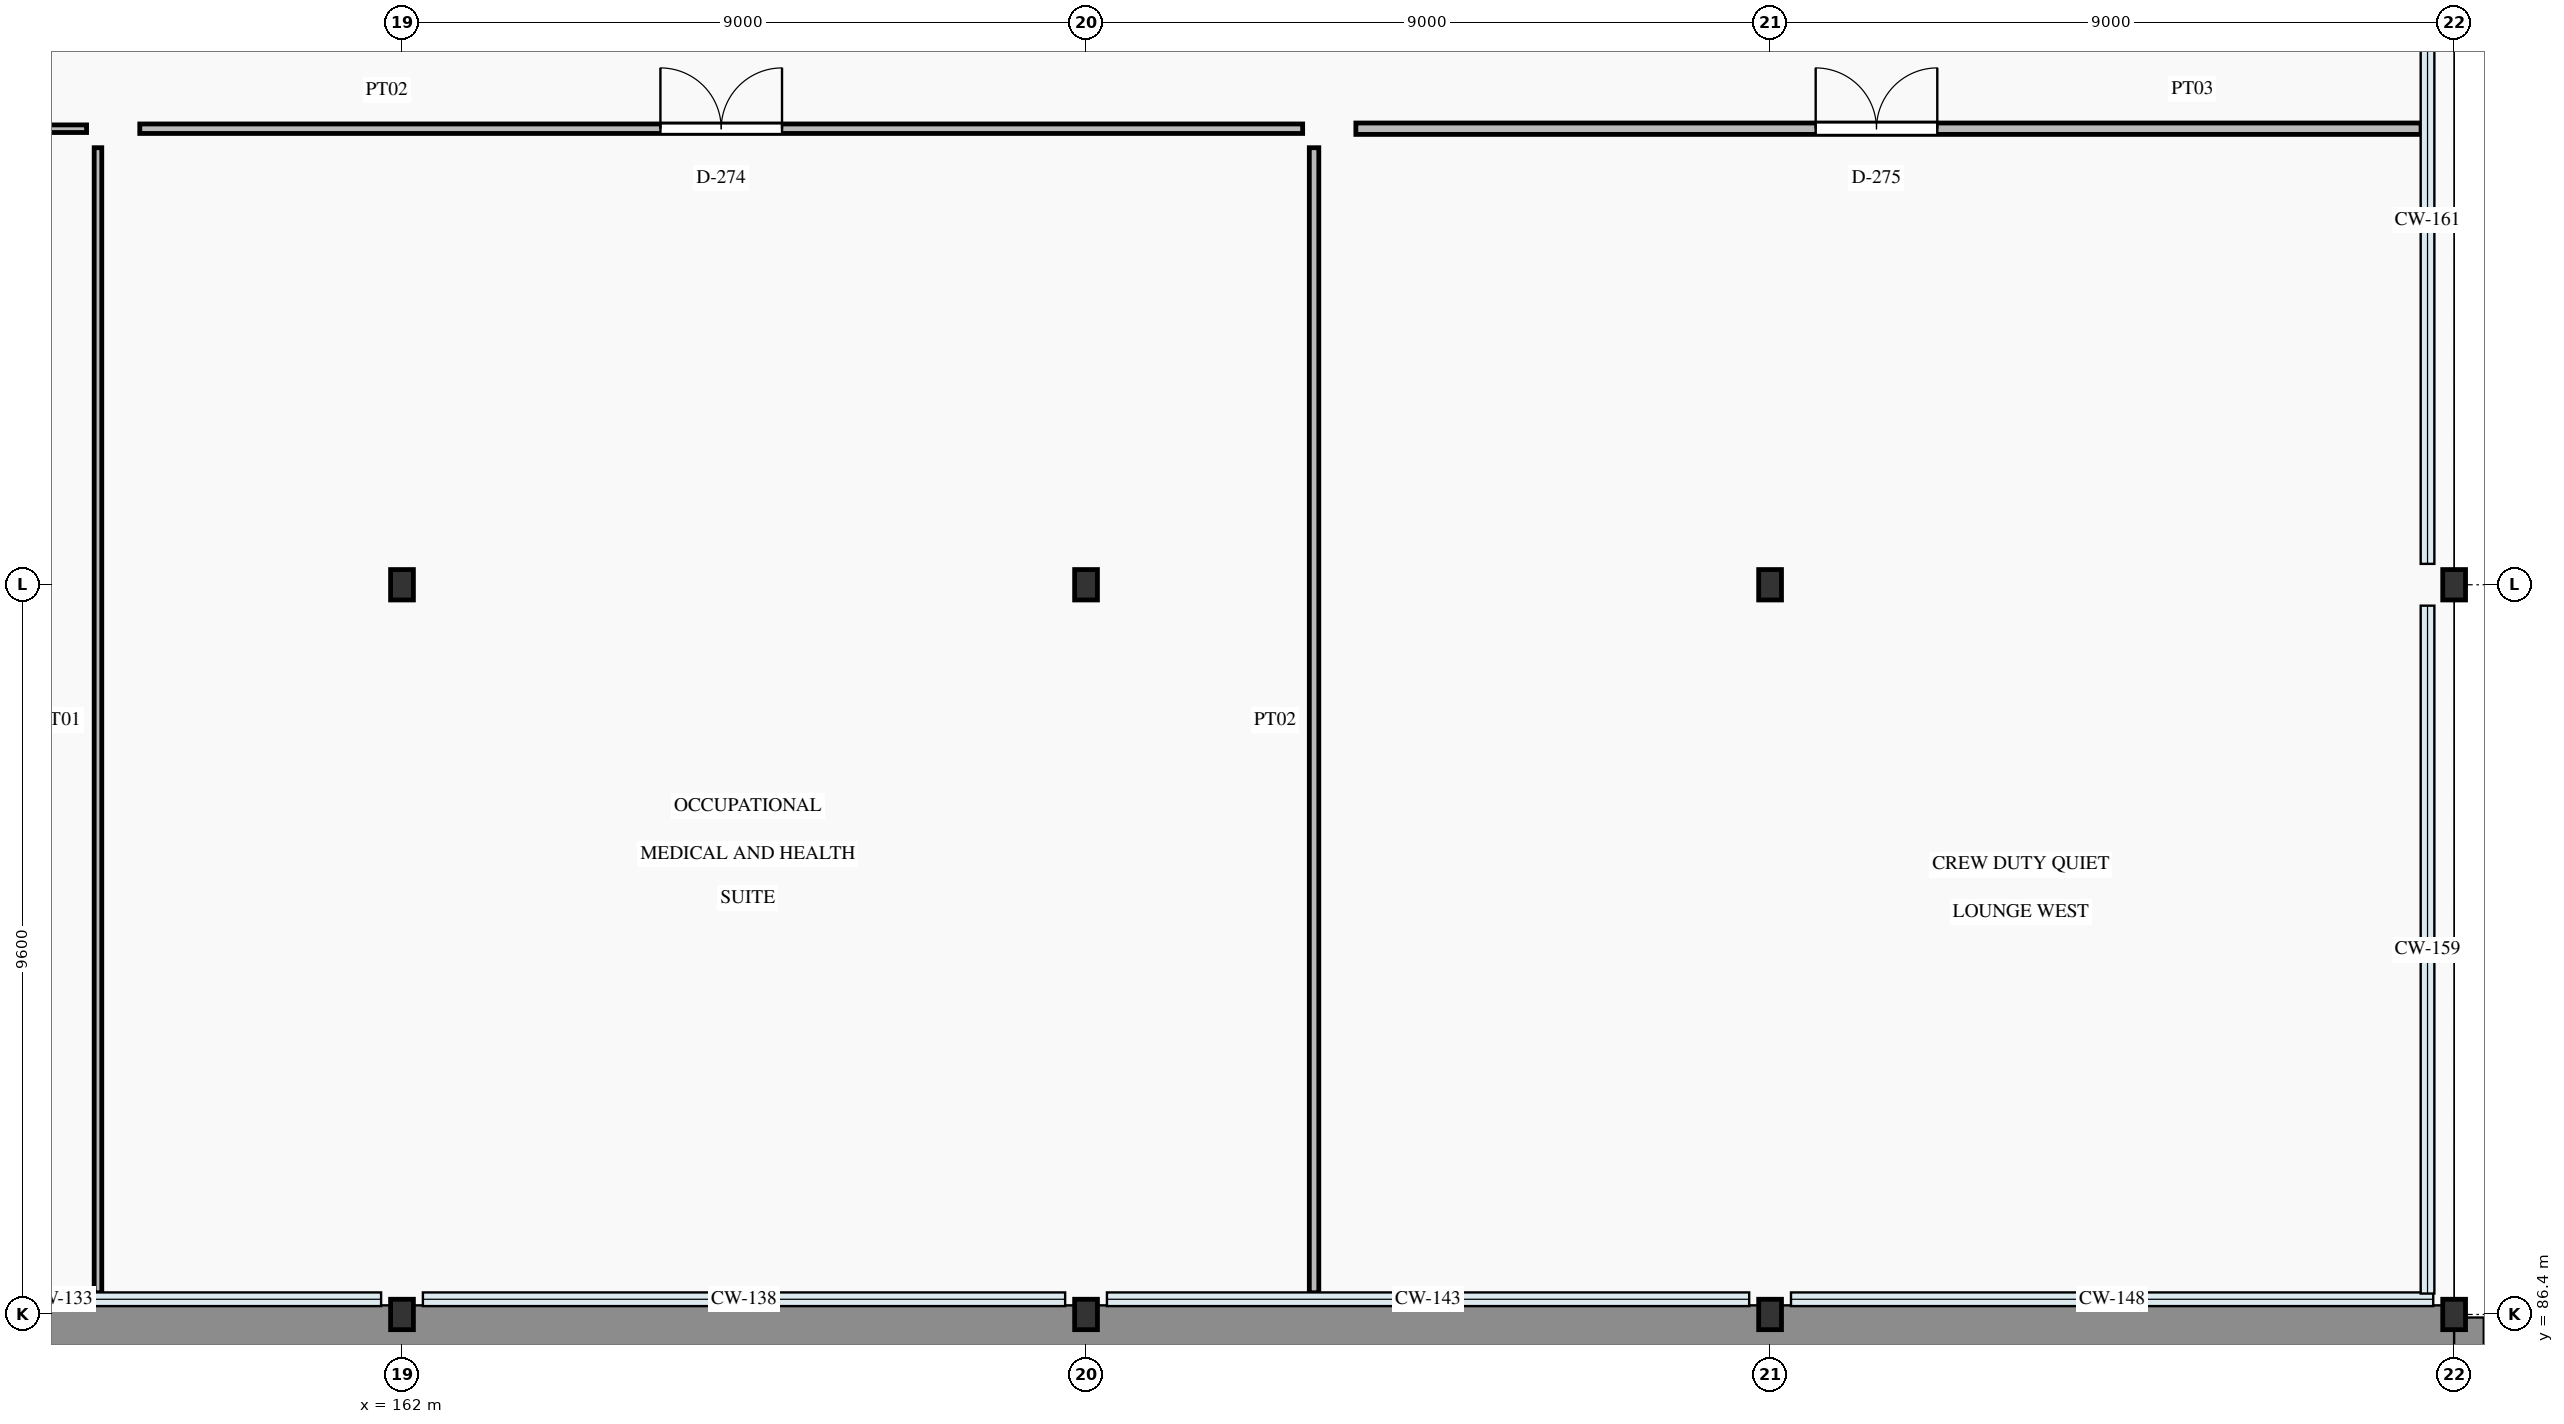
"""IFC4 building model, lengths in metres.
Left out: names, types, materials, properties, quantities, classifications, styles, units other than length and angle.
Written with IfcOpenShell. Run it as: python <this file> out.ifc"""

import sys

from ifc_helpers import new_model, si_unit, direction, frame, frame_2d, origin, origin_2d, place, context, subcontext, project, spatial, rectangle, i_section, extrude, element, fill, save


model = new_model("IFC4")
c1 = context("Model", 3, precision=1e-05, world=origin(), true_north=direction((0.0, 1.0)))
c2 = subcontext(c1, "Body", "Model", "MODEL_VIEW")
j1 = project(units=[si_unit("LENGTHUNIT", "METRE"), si_unit("PLANEANGLEUNIT", "RADIAN")], contexts=[c1])
p1 = place(None, origin())
s1 = spatial("IfcSite", under=j1, at=p1, CompositionType="ELEMENT")
p2 = place(p1, origin())
s2 = spatial("IfcBuilding", under=s1, at=p2, CompositionType="ELEMENT")
p3 = place(p2, frame((0.0, 0.0, 15.0)))
s3 = spatial("IfcBuildingStorey", under=s2, at=p3, CompositionType="ELEMENT", Elevation=15.0)
for number, where, z_axis, x_axis in (
    (1, (162.0, 86.4, 0.0), (0.0, 0.0, 1.0), (1.0, 0.0, 0.0)),
    (2, (162.0, 96.0, 0.0), (0.0, 0.0, 1.0), (1.0, 0.0, 0.0)),
    (3, (171.0, 86.4, 0.0), (0.0, 0.0, 1.0), (1.0, 0.0, 0.0)),
    (4, (171.0, 96.0, 0.0), (0.0, 0.0, 1.0), (1.0, 0.0, 0.0)),
    (5, (180.0, 86.4, 0.0), (0.0, 0.0, 1.0), (1.0, 0.0, 0.0)),
    (6, (180.0, 96.0, 0.0), (0.0, 0.0, 1.0), (1.0, 0.0, 0.0)),
    (7, (189.0, 86.4, 0.0), (0.0, 0.0, 1.0), (1.0, 0.0, 0.0)),
    (8, (189.0, 96.0, 0.0), (0.0, 0.0, 1.0), (1.0, 0.0, 0.0)),
):
    element("IfcColumn", number, at=place(p3, frame(where, z_axis=z_axis, x_axis=x_axis)), inside=s3, PredefinedType="COLUMN", context=c2, shape_type="SweptSolid", body=[
        extrude(i_section(OverallWidth=0.3, OverallDepth=0.4, WebThickness=0.013, FlangeThickness=0.024, FilletRadius=0.027, at=origin_2d()), origin(), (0.0, 0.0, 1.0), 3.9),
    ])
p4 = place(p3, frame((142.96, 102.0, 0.0), z_axis=(0.0, 0.0, 1.0), x_axis=(1.0, 0.0, 0.0)))
e9 = element("IfcWall", 9, at=p4, inside=s3, PredefinedType="PARTITIONING", context=c2, shape_type="SweptSolid", body=[
    extrude(rectangle(XDim=14.89, YDim=0.1, at=frame_2d((7.445, 0.0))), origin(), (0.0, 0.0, 1.0), 3.64),
])
p5 = place(p4, frame((6.545, 0.0, 0.0)))
e10 = element("IfcOpeningElement", 10, at=p5, cuts=e9, PredefinedType="OPENING", context=c2, shape_type="SweptSolid", body=[
    extrude(rectangle(XDim=1.8, YDim=2.3, at=frame_2d((0.9, 1.15))), frame((0.0, 0.065, 0.0), z_axis=(0.0, -1.0, 0.0), x_axis=(1.0, 0.0, 0.0)), (0.0, 0.0, 1.0), 0.13),
])
p6 = place(p3, frame((158.55, 102.0, 0.0), z_axis=(0.0, 0.0, 1.0), x_axis=(1.0, 0.0, 0.0)))
e11 = element("IfcWall", 11, at=p6, inside=s3, PredefinedType="PARTITIONING", context=c2, shape_type="SweptSolid", body=[
    extrude(rectangle(XDim=15.3, YDim=0.125, at=frame_2d((7.65, 0.0))), origin(), (0.0, 0.0, 1.0), 3.64),
])
p7 = place(p6, frame((6.85, 0.0, 0.0)))
e12 = element("IfcOpeningElement", 12, at=p7, cuts=e11, PredefinedType="OPENING", context=c2, shape_type="SweptSolid", body=[
    extrude(rectangle(XDim=1.6, YDim=2.25, at=frame_2d((0.8, 1.125))), frame((0.0, 0.077, 0.0), z_axis=(0.0, -1.0, 0.0), x_axis=(1.0, 0.0, 0.0)), (0.0, 0.0, 1.0), 0.155),
])
p8 = place(p3, frame((174.55, 102.0, 0.0), z_axis=(0.0, 0.0, 1.0), x_axis=(1.0, 0.0, 0.0)))
e13 = element("IfcWall", 13, at=p8, inside=s3, PredefinedType="PARTITIONING", context=c2, shape_type="SweptSolid", body=[
    extrude(rectangle(XDim=14.015, YDim=0.15, at=frame_2d((7.007, 0.0))), origin(), (0.0, 0.0, 1.0), 3.64),
])
p9 = place(p8, frame((6.05, 0.0, 0.0)))
e14 = element("IfcOpeningElement", 14, at=p9, cuts=e13, PredefinedType="OPENING", context=c2, shape_type="SweptSolid", body=[
    extrude(rectangle(XDim=1.6, YDim=2.25, at=frame_2d((0.8, 1.125))), frame((0.0, 0.09, 0.0), z_axis=(0.0, -1.0, 0.0), x_axis=(1.0, 0.0, 0.0)), (0.0, 0.0, 1.0), 0.18),
])
p10 = place(p3, frame((158.0, 86.685, 0.0), z_axis=(0.0, 0.0, 1.0), x_axis=(0.0, 1.0, 0.0)))
e15 = element("IfcWall", 15, at=p10, inside=s3, PredefinedType="PARTITIONING", context=c2, shape_type="SweptSolid", body=[
    extrude(rectangle(XDim=15.065, YDim=0.1, at=frame_2d((7.532, 0.0))), origin(), (0.0, 0.0, 1.0), 3.64),
])
p11 = place(p3, frame((174.0, 86.685, 0.0), z_axis=(0.0, 0.0, 1.0), x_axis=(0.0, 1.0, 0.0)))
e16 = element("IfcWall", 16, at=p11, inside=s3, PredefinedType="PARTITIONING", context=c2, shape_type="SweptSolid", body=[
    extrude(rectangle(XDim=15.065, YDim=0.125, at=frame_2d((7.532, 0.0))), origin(), (0.0, 0.0, 1.0), 3.64),
])
p12 = place(p7, origin())
e17 = element("IfcDoor", 17, at=p12, inside=s3, OperationType="DOUBLE_DOOR_SINGLE_SWING", PredefinedType="DOOR", context=c2, shape_type="SweptSolid", body=[
    extrude(rectangle(XDim=1.6, YDim=2.25, at=frame_2d((0.8, 1.125))), frame((0.0, 0.025, 0.0), z_axis=(0.0, -1.0, 0.0), x_axis=(1.0, 0.0, 0.0)), (0.0, 0.0, 1.0), 0.05),
])
fill(e12, e17)
p13 = place(p9, origin())
e18 = element("IfcDoor", 18, at=p13, inside=s3, OperationType="DOUBLE_DOOR_SINGLE_SWING", PredefinedType="DOOR", context=c2, shape_type="SweptSolid", body=[
    extrude(rectangle(XDim=1.6, YDim=2.25, at=frame_2d((0.8, 1.125))), frame((0.0, 0.025, 0.0), z_axis=(0.0, -1.0, 0.0), x_axis=(1.0, 0.0, 0.0)), (0.0, 0.0, 1.0), 0.05),
])
fill(e14, e18)
save(model, sys.argv[1])
